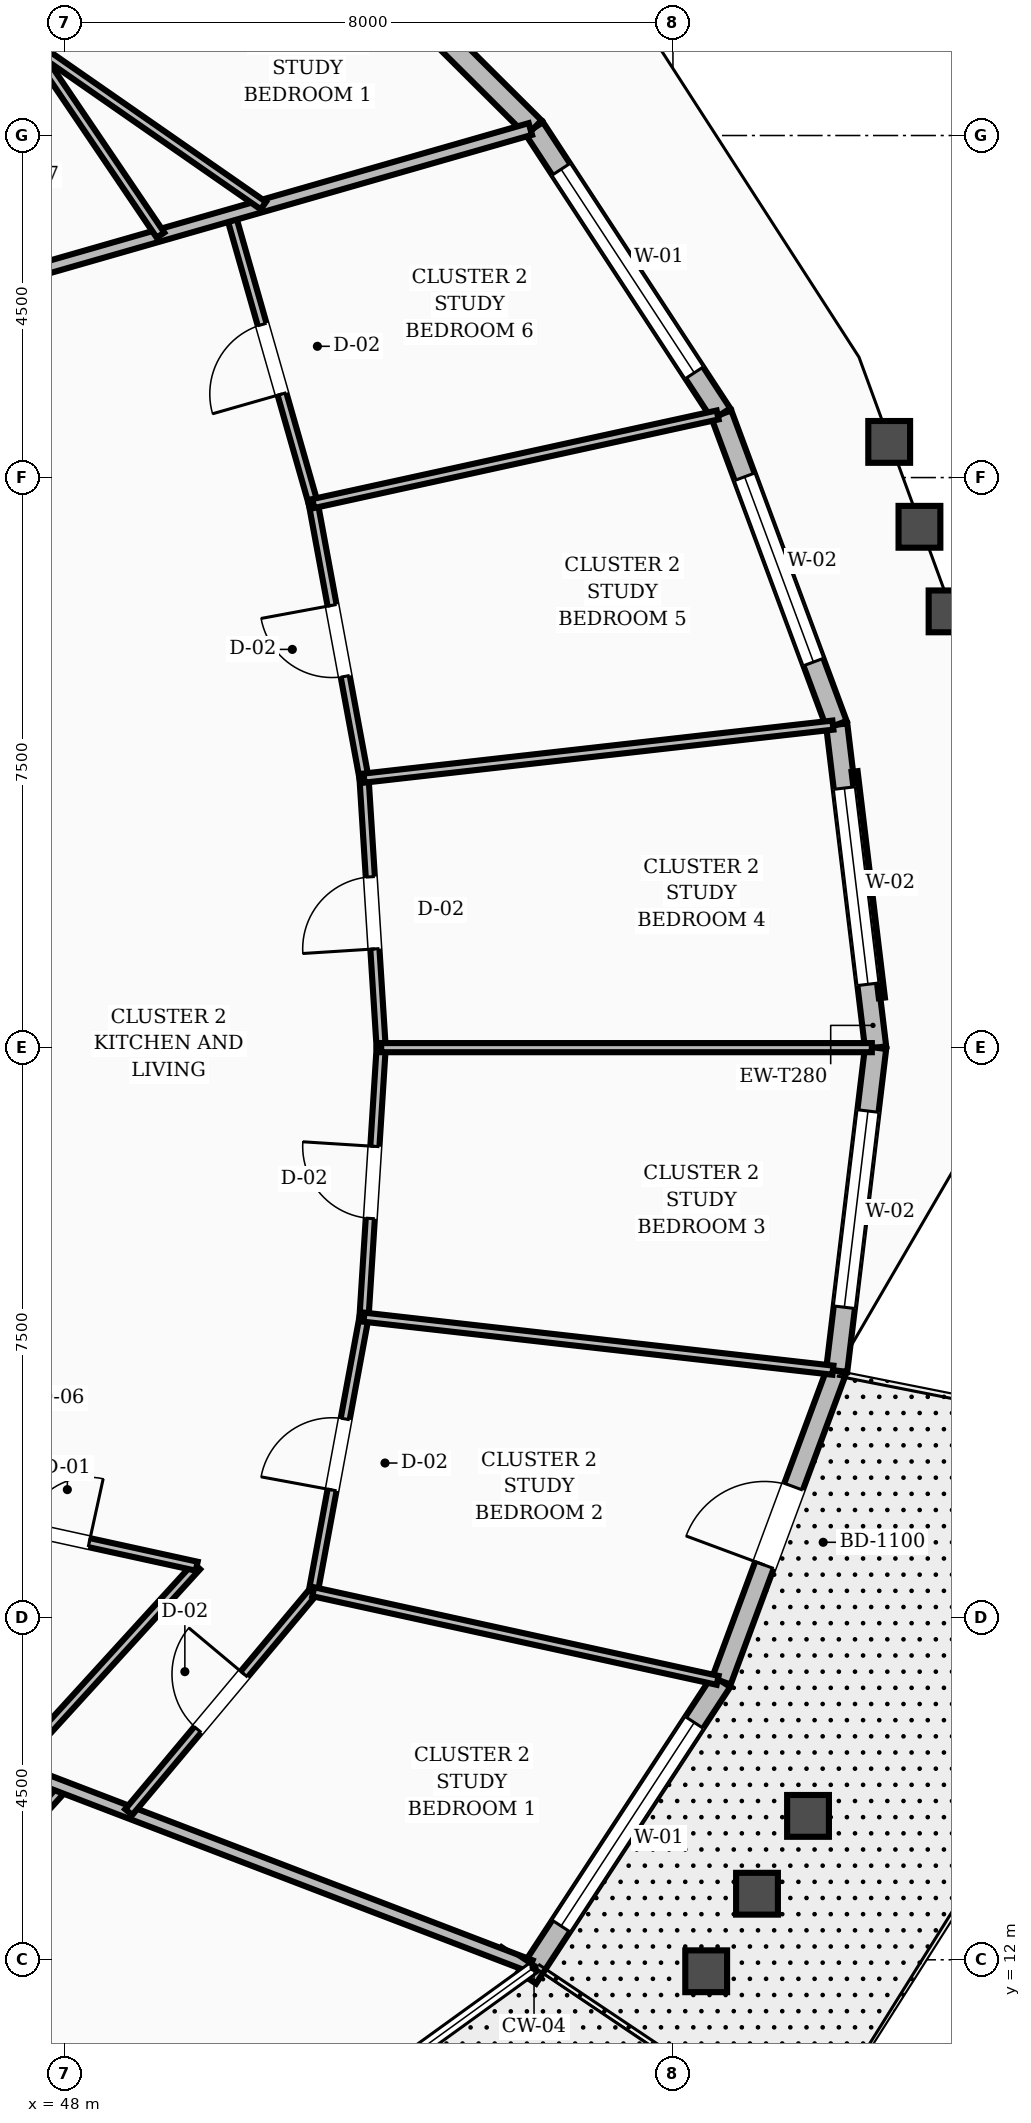
"""IFC4 building model, lengths in metres.
Left out: names, types, materials, properties, quantities, classifications, styles, units other than length and angle.
Written with IfcOpenShell. Run it as: python <this file> out.ifc"""

import sys

from ifc_helpers import new_model, si_unit, direction, frame, frame_2d, origin, place, context, subcontext, project, spatial, rectangle, extrude, element, fill, save


model = new_model("IFC4")
c1 = context("Model", 3, precision=1e-05, world=origin(), true_north=direction((0.0, 1.0)))
c2 = subcontext(c1, "Body", "Model", "MODEL_VIEW")
j1 = project(units=[si_unit("LENGTHUNIT", "METRE"), si_unit("PLANEANGLEUNIT", "RADIAN")], contexts=[c1])
p1 = place(None, origin())
s1 = spatial("IfcSite", under=j1, at=p1, CompositionType="ELEMENT")
p2 = place(p1, origin())
s2 = spatial("IfcBuilding", under=s1, at=p2, CompositionType="ELEMENT")
p3 = place(p2, frame((0.0, 0.0, 124.4)))
s3 = spatial("IfcBuildingStorey", under=s2, at=p3, CompositionType="ELEMENT", Elevation=124.4)
p4 = place(p3, frame((58.667, 24.0, 0.0), z_axis=(0.0, 0.0, 1.0), x_axis=(-0.119687341708, 0.992811633813, 0.0)))
e1 = element("IfcWall", 1, at=p4, inside=s3, PredefinedType="STANDARD", context=c2, shape_type="SweptSolid", body=[
    extrude(rectangle(XDim=4.28, YDim=0.28, at=frame_2d((2.14, 0.0))), origin(), (0.0, 0.0, 1.0), 2.82),
])
p5 = place(p4, frame((0.84, 0.0, 0.8)))
e2 = element("IfcOpeningElement", 2, at=p5, cuts=e1, PredefinedType="OPENING", context=c2, shape_type="SweptSolid", body=[
    extrude(rectangle(XDim=2.6, YDim=1.65, at=frame_2d((1.3, 0.825))), frame((0.0, 0.15, 0.0), z_axis=(0.0, -1.0, 0.0), x_axis=(1.0, 0.0, 0.0)), (0.0, 0.0, 1.0), 0.3),
])
p6 = place(p3, frame((58.154, 28.249, 0.0), z_axis=(0.0, 0.0, 1.0), x_axis=(-0.348211846364, 0.937415868253, 0.0)))
e3 = element("IfcWall", 3, at=p6, inside=s3, PredefinedType="STANDARD", context=c2, shape_type="SweptSolid", body=[
    extrude(rectangle(XDim=4.358, YDim=0.28, at=frame_2d((2.179, 0.0))), origin(), (0.0, 0.0, 1.0), 2.82),
])
p7 = place(p6, frame((0.879, 0.0, 0.8)))
e4 = element("IfcOpeningElement", 4, at=p7, cuts=e3, PredefinedType="OPENING", context=c2, shape_type="SweptSolid", body=[
    extrude(rectangle(XDim=2.6, YDim=1.65, at=frame_2d((1.3, 0.825))), frame((0.0, 0.15, 0.0), z_axis=(0.0, -1.0, 0.0), x_axis=(1.0, 0.0, 0.0)), (0.0, 0.0, 1.0), 0.3),
])
p8 = place(p3, frame((56.637, 32.334, 0.0), z_axis=(0.0, 0.0, 1.0), x_axis=(-0.547581138096, 0.836752590197, 0.0)))
e5 = element("IfcWall", 5, at=p8, inside=s3, PredefinedType="STANDARD", context=c2, shape_type="SweptSolid", body=[
    extrude(rectangle(XDim=4.5, YDim=0.28, at=frame_2d((2.25, 0.0))), origin(), (0.0, 0.0, 1.0), 2.82),
])
p9 = place(p8, frame((0.65, 0.0, 0.8)))
e6 = element("IfcOpeningElement", 6, at=p9, cuts=e5, PredefinedType="OPENING", context=c2, shape_type="SweptSolid", body=[
    extrude(rectangle(XDim=3.2, YDim=1.65, at=frame_2d((1.6, 0.825))), frame((0.0, 0.15, 0.0), z_axis=(0.0, -1.0, 0.0), x_axis=(1.0, 0.0, 0.0)), (0.0, 0.0, 1.0), 0.3),
])
p10 = place(p3, frame((54.173, 36.1, 0.0), z_axis=(0.0, 0.0, 1.0), x_axis=(-0.708826657364, 0.70538271159, 0.0)))
e7 = element("IfcWall", 7, at=p10, inside=s3, PredefinedType="STANDARD", context=c2, shape_type="SweptSolid", body=[
    extrude(rectangle(XDim=4.679, YDim=0.28, at=frame_2d((2.339, 0.0))), origin(), (0.0, 0.0, 1.0), 2.82),
])
p11 = place(p3, frame((54.083, 11.763, 0.0), z_axis=(0.0, 0.0, 1.0), x_axis=(0.54762586096, 0.8367233213, 0.0)))
e8 = element("IfcWall", 8, at=p11, inside=s3, PredefinedType="STANDARD", context=c2, shape_type="SweptSolid", body=[
    extrude(rectangle(XDim=4.664, YDim=0.28, at=frame_2d((2.332, 0.0))), origin(), (0.0, 0.0, 1.0), 2.82),
])
p12 = place(p11, frame((0.814, 0.0, 0.8)))
e9 = element("IfcOpeningElement", 9, at=p12, cuts=e8, PredefinedType="OPENING", context=c2, shape_type="SweptSolid", body=[
    extrude(rectangle(XDim=3.2, YDim=1.65, at=frame_2d((1.6, 0.825))), frame((0.0, 0.15, 0.0), z_axis=(0.0, -1.0, 0.0), x_axis=(1.0, 0.0, 0.0)), (0.0, 0.0, 1.0), 0.3),
])
p13 = place(p3, frame((56.637, 15.666, 0.0), z_axis=(0.0, 0.0, 1.0), x_axis=(0.348211846364, 0.937415868253, 0.0)))
e10 = element("IfcWall", 10, at=p13, inside=s3, PredefinedType="STANDARD", context=c2, shape_type="SweptSolid", body=[
    extrude(rectangle(XDim=4.358, YDim=0.26, at=frame_2d((2.179, 0.0))), origin(), (0.0, 0.0, 1.0), 2.82),
])
p14 = place(p13, frame((1.629, 0.0, 0.0)))
e11 = element("IfcOpeningElement", 11, at=p14, cuts=e10, PredefinedType="OPENING", context=c2, shape_type="SweptSolid", body=[
    extrude(rectangle(XDim=1.1, YDim=2.15, at=frame_2d((0.55, 1.075))), frame((0.0, 0.14, 0.0), z_axis=(0.0, -1.0, 0.0), x_axis=(1.0, 0.0, 0.0)), (0.0, 0.0, 1.0), 0.28),
])
p15 = place(p3, frame((58.154, 19.751, 0.0), z_axis=(0.0, 0.0, 1.0), x_axis=(0.119687341708, 0.992811633813, 0.0)))
e12 = element("IfcWall", 12, at=p15, inside=s3, PredefinedType="STANDARD", context=c2, shape_type="SweptSolid", body=[
    extrude(rectangle(XDim=4.28, YDim=0.28, at=frame_2d((2.14, 0.0))), origin(), (0.0, 0.0, 1.0), 2.82),
])
p16 = place(p15, frame((0.84, 0.0, 0.8)))
e13 = element("IfcOpeningElement", 13, at=p16, cuts=e12, PredefinedType="OPENING", context=c2, shape_type="SweptSolid", body=[
    extrude(rectangle(XDim=2.6, YDim=1.65, at=frame_2d((1.3, 0.825))), frame((0.0, 0.15, 0.0), z_axis=(0.0, -1.0, 0.0), x_axis=(1.0, 0.0, 0.0)), (0.0, 0.0, 1.0), 0.3),
])
p17 = place(p3, frame((45.579, 11.631, 0.0), z_axis=(0.0, 0.0, 1.0), x_axis=(0.673346353961, 0.739327185762, 0.0)))
e14 = element("IfcWall", 14, at=p17, inside=s3, PredefinedType="PARTITIONING", context=c2, shape_type="SweptSolid", body=[
    extrude(rectangle(XDim=3.571, YDim=0.12, at=frame_2d((1.785, 0.0))), origin(), (0.0, 0.0, 1.0), 2.8),
])
p18 = place(p3, frame((44.65, 15.548, 0.0), z_axis=(0.0, 0.0, 1.0), x_axis=(0.933853161124, -0.35765664185, 0.0)))
e15 = element("IfcWall", 15, at=p18, inside=s3, PredefinedType="SOLIDWALL", context=c2, shape_type="SweptSolid", body=[
    extrude(rectangle(XDim=10.147, YDim=0.16, at=frame_2d((5.073, 0.0))), origin(), (0.0, 0.0, 1.0), 2.8),
])
p19 = place(p3, frame((47.316, 14.526, 0.0), z_axis=(0.0, 0.0, 1.0), x_axis=(0.673803025367, 0.738911011562, 0.0)))
e16 = element("IfcWall", 16, at=p19, inside=s3, PredefinedType="PARTITIONING", context=c2, shape_type="SweptSolid", body=[
    extrude(rectangle(XDim=3.589, YDim=0.12, at=frame_2d((1.794, 0.0))), origin(), (0.0, 0.0, 1.0), 2.8),
])
p20 = place(p3, frame((47.05, 17.766, 0.0), z_axis=(0.0, 0.0, 1.0), x_axis=(0.976828673368, -0.214022762541, 0.0)))
e17 = element("IfcWall", 17, at=p20, inside=s3, PredefinedType="PARTITIONING", context=c2, shape_type="SweptSolid", body=[
    extrude(rectangle(XDim=2.748, YDim=0.12, at=frame_2d((1.374, 0.0))), origin(), (0.0, 0.0, 1.0), 2.8),
])
p21 = place(p20, frame((0.44, 0.0, 0.0)))
e18 = element("IfcOpeningElement", 18, at=p21, cuts=e17, PredefinedType="OPENING", context=c2, shape_type="SweptSolid", body=[
    extrude(rectangle(XDim=0.86, YDim=2.1, at=frame_2d((0.43, 1.05))), frame((0.0, 0.07, 0.0), z_axis=(0.0, -1.0, 0.0), x_axis=(1.0, 0.0, 0.0)), (0.0, 0.0, 1.0), 0.14),
])
p22 = place(p3, frame((48.84, 13.943, 0.0), z_axis=(0.0, 0.0, 1.0), x_axis=(0.64212553746, 0.766599500483, 0.0)))
e19 = element("IfcWall", 19, at=p22, inside=s3, PredefinedType="PARTITIONING", context=c2, shape_type="SweptSolid", body=[
    extrude(rectangle(XDim=3.781, YDim=0.12, at=frame_2d((1.891, 0.0))), origin(), (0.0, 0.0, 1.0), 2.8),
])
p23 = place(p22, frame((1.416, 0.0, 0.0)))
e20 = element("IfcOpeningElement", 20, at=p23, cuts=e19, PredefinedType="OPENING", context=c2, shape_type="SweptSolid", body=[
    extrude(rectangle(XDim=0.95, YDim=2.1, at=frame_2d((0.475, 1.05))), frame((0.0, 0.07, 0.0), z_axis=(0.0, -1.0, 0.0), x_axis=(1.0, 0.0, 0.0)), (0.0, 0.0, 1.0), 0.14),
])
p24 = place(p3, frame((51.268, 16.842, 0.0), z_axis=(0.0, 0.0, 1.0), x_axis=(0.181767968599, 0.983341449137, 0.0)))
e21 = element("IfcWall", 21, at=p24, inside=s3, PredefinedType="PARTITIONING", context=c2, shape_type="SweptSolid", body=[
    extrude(rectangle(XDim=3.674, YDim=0.12, at=frame_2d((1.837, 0.0))), origin(), (0.0, 0.0, 1.0), 2.8),
])
p25 = place(p24, frame((1.362, 0.0, 0.0)))
e22 = element("IfcOpeningElement", 22, at=p25, cuts=e21, PredefinedType="OPENING", context=c2, shape_type="SweptSolid", body=[
    extrude(rectangle(XDim=0.95, YDim=2.1, at=frame_2d((0.475, 1.05))), frame((0.0, 0.07, 0.0), z_axis=(0.0, -1.0, 0.0), x_axis=(1.0, 0.0, 0.0)), (0.0, 0.0, 1.0), 0.14),
])
p26 = place(p3, frame((51.268, 16.842, 0.0), z_axis=(0.0, 0.0, 1.0), x_axis=(0.976839732101, -0.213972282759, 0.0)))
e23 = element("IfcWall", 23, at=p26, inside=s3, PredefinedType="PARTITIONING", context=c2, shape_type="SweptSolid", body=[
    extrude(rectangle(XDim=5.446, YDim=0.12, at=frame_2d((2.723, 0.0))), origin(), (0.0, 0.0, 1.0), 2.8),
])
p27 = place(p3, frame((51.936, 20.454, 0.0), z_axis=(0.0, 0.0, 1.0), x_axis=(0.063490483218, 0.997982444004, 0.0)))
e24 = element("IfcWall", 24, at=p27, inside=s3, PredefinedType="PARTITIONING", context=c2, shape_type="SweptSolid", body=[
    extrude(rectangle(XDim=3.553, YDim=0.12, at=frame_2d((1.776, 0.0))), origin(), (0.0, 0.0, 1.0), 2.8),
])
p28 = place(p27, frame((1.302, 0.0, 0.0)))
e25 = element("IfcOpeningElement", 25, at=p28, cuts=e24, PredefinedType="OPENING", context=c2, shape_type="SweptSolid", body=[
    extrude(rectangle(XDim=0.95, YDim=2.1, at=frame_2d((0.475, 1.05))), frame((0.0, 0.07, 0.0), z_axis=(0.0, -1.0, 0.0), x_axis=(1.0, 0.0, 0.0)), (0.0, 0.0, 1.0), 0.14),
])
p29 = place(p3, frame((51.936, 20.454, 0.0), z_axis=(0.0, 0.0, 1.0), x_axis=(0.993672361239, -0.112317578806, 0.0)))
e26 = element("IfcWall", 26, at=p29, inside=s3, PredefinedType="PARTITIONING", context=c2, shape_type="SweptSolid", body=[
    extrude(rectangle(XDim=6.208, YDim=0.12, at=frame_2d((3.104, 0.0))), origin(), (0.0, 0.0, 1.0), 2.8),
])
p30 = place(p3, frame((52.161, 24.0, 0.0), z_axis=(0.0, 0.0, 1.0), x_axis=(-0.063490483218, 0.997982444004, 0.0)))
e27 = element("IfcWall", 27, at=p30, inside=s3, PredefinedType="PARTITIONING", context=c2, shape_type="SweptSolid", body=[
    extrude(rectangle(XDim=3.553, YDim=0.12, at=frame_2d((1.776, 0.0))), origin(), (0.0, 0.0, 1.0), 2.8),
])
p31 = place(p30, frame((1.302, 0.0, 0.0)))
e28 = element("IfcOpeningElement", 28, at=p31, cuts=e27, PredefinedType="OPENING", context=c2, shape_type="SweptSolid", body=[
    extrude(rectangle(XDim=0.95, YDim=2.1, at=frame_2d((0.475, 1.05))), frame((0.0, 0.07, 0.0), z_axis=(0.0, -1.0, 0.0), x_axis=(1.0, 0.0, 0.0)), (0.0, 0.0, 1.0), 0.14),
])
p32 = place(p3, frame((52.161, 24.0, 0.0), z_axis=(0.0, 0.0, 1.0), x_axis=(1.0, 0.0, 0.0)))
e29 = element("IfcWall", 29, at=p32, inside=s3, PredefinedType="PARTITIONING", context=c2, shape_type="SweptSolid", body=[
    extrude(rectangle(XDim=6.455, YDim=0.12, at=frame_2d((3.228, 0.0))), origin(), (0.0, 0.0, 1.0), 2.8),
])
p33 = place(p3, frame((51.936, 27.546, 0.0), z_axis=(0.0, 0.0, 1.0), x_axis=(-0.181767968599, 0.983341449137, 0.0)))
e30 = element("IfcWall", 30, at=p33, inside=s3, PredefinedType="PARTITIONING", context=c2, shape_type="SweptSolid", body=[
    extrude(rectangle(XDim=3.674, YDim=0.12, at=frame_2d((1.837, 0.0))), origin(), (0.0, 0.0, 1.0), 2.8),
])
p34 = place(p33, frame((1.362, 0.0, 0.0)))
e31 = element("IfcOpeningElement", 31, at=p34, cuts=e30, PredefinedType="OPENING", context=c2, shape_type="SweptSolid", body=[
    extrude(rectangle(XDim=0.95, YDim=2.1, at=frame_2d((0.475, 1.05))), frame((0.0, 0.07, 0.0), z_axis=(0.0, -1.0, 0.0), x_axis=(1.0, 0.0, 0.0)), (0.0, 0.0, 1.0), 0.14),
])
p35 = place(p3, frame((51.936, 27.546, 0.0), z_axis=(0.0, 0.0, 1.0), x_axis=(0.993672361239, 0.112317578806, 0.0)))
e32 = element("IfcWall", 32, at=p35, inside=s3, PredefinedType="PARTITIONING", context=c2, shape_type="SweptSolid", body=[
    extrude(rectangle(XDim=6.208, YDim=0.12, at=frame_2d((3.104, 0.0))), origin(), (0.0, 0.0, 1.0), 2.8),
])
p36 = place(p3, frame((51.268, 31.158, 0.0), z_axis=(0.0, 0.0, 1.0), x_axis=(-0.274582301576, 0.961563601465, 0.0)))
e33 = element("IfcWall", 33, at=p36, inside=s3, PredefinedType="PARTITIONING", context=c2, shape_type="SweptSolid", body=[
    extrude(rectangle(XDim=3.949, YDim=0.12, at=frame_2d((1.974, 0.0))), origin(), (0.0, 0.0, 1.0), 2.8),
])
p37 = place(p36, frame((1.5, 0.0, 0.0)))
e34 = element("IfcOpeningElement", 34, at=p37, cuts=e33, PredefinedType="OPENING", context=c2, shape_type="SweptSolid", body=[
    extrude(rectangle(XDim=0.95, YDim=2.1, at=frame_2d((0.475, 1.05))), frame((0.0, 0.07, 0.0), z_axis=(0.0, -1.0, 0.0), x_axis=(1.0, 0.0, 0.0)), (0.0, 0.0, 1.0), 0.14),
])
p38 = place(p3, frame((51.268, 31.158, 0.0), z_axis=(0.0, 0.0, 1.0), x_axis=(0.976839732101, 0.213972282759, 0.0)))
e35 = element("IfcWall", 35, at=p38, inside=s3, PredefinedType="PARTITIONING", context=c2, shape_type="SweptSolid", body=[
    extrude(rectangle(XDim=5.446, YDim=0.12, at=frame_2d((2.723, 0.0))), origin(), (0.0, 0.0, 1.0), 2.8),
])
p39 = place(p3, frame((47.05, 34.056, 0.0), z_axis=(0.0, 0.0, 1.0), x_axis=(0.96122671613, 0.275759315705, 0.0)))
e36 = element("IfcWall", 36, at=p39, inside=s3, PredefinedType="SOLIDWALL", context=c2, shape_type="SweptSolid", body=[
    extrude(rectangle(XDim=7.36, YDim=0.16, at=frame_2d((3.68, 0.0))), origin(), (0.0, 0.0, 1.0), 2.8),
])
p40 = place(p3, frame((49.258, 34.69, 0.0), z_axis=(0.0, 0.0, 1.0), x_axis=(-0.560422606551, 0.828206799095, 0.0)))
e37 = element("IfcWall", 37, at=p40, inside=s3, PredefinedType="PARTITIONING", context=c2, shape_type="SweptSolid", body=[
    extrude(rectangle(XDim=3.959, YDim=0.12, at=frame_2d((1.979, 0.0))), origin(), (0.0, 0.0, 1.0), 2.8),
])
p41 = place(p3, frame((50.611, 35.078, 0.0), z_axis=(0.0, 0.0, 1.0), x_axis=(-0.821081312211, 0.570811246156, 0.0)))
e38 = element("IfcWall", 38, at=p41, inside=s3, PredefinedType="PARTITIONING", context=c2, shape_type="SweptSolid", body=[
    extrude(rectangle(XDim=8.192, YDim=0.12, at=frame_2d((4.096, 0.0))), origin(), (0.0, 0.0, 1.0), 2.8),
])
p42 = place(p41, frame((5.021, 0.0, 0.0)))
e39 = element("IfcOpeningElement", 39, at=p42, cuts=e38, PredefinedType="OPENING", context=c2, shape_type="SweptSolid", body=[
    extrude(rectangle(XDim=0.95, YDim=2.1, at=frame_2d((0.475, 1.05))), frame((0.0, 0.07, 0.0), z_axis=(0.0, -1.0, 0.0), x_axis=(1.0, 0.0, 0.0)), (0.0, 0.0, 1.0), 0.14),
])
p43 = place(p5, origin())
e40 = element("IfcWindow", 40, at=p43, inside=s3, PartitioningType="SINGLE_PANEL", PredefinedType="WINDOW", context=c2, shape_type="SweptSolid", body=[
    extrude(rectangle(XDim=2.6, YDim=1.65, at=frame_2d((1.3, 0.825))), frame((0.0, 0.03, 0.0), z_axis=(0.0, -1.0, 0.0), x_axis=(1.0, 0.0, 0.0)), (0.0, 0.0, 1.0), 0.06),
])
fill(e2, e40)
p44 = place(p7, origin())
e41 = element("IfcWindow", 41, at=p44, inside=s3, PartitioningType="SINGLE_PANEL", PredefinedType="WINDOW", context=c2, shape_type="SweptSolid", body=[
    extrude(rectangle(XDim=2.6, YDim=1.65, at=frame_2d((1.3, 0.825))), frame((0.0, 0.03, 0.0), z_axis=(0.0, -1.0, 0.0), x_axis=(1.0, 0.0, 0.0)), (0.0, 0.0, 1.0), 0.06),
])
fill(e4, e41)
p45 = place(p9, origin())
e42 = element("IfcWindow", 42, at=p45, inside=s3, PartitioningType="SINGLE_PANEL", PredefinedType="WINDOW", context=c2, shape_type="SweptSolid", body=[
    extrude(rectangle(XDim=3.2, YDim=1.65, at=frame_2d((1.6, 0.825))), frame((0.0, 0.03, 0.0), z_axis=(0.0, -1.0, 0.0), x_axis=(1.0, 0.0, 0.0)), (0.0, 0.0, 1.0), 0.06),
])
fill(e6, e42)
p46 = place(p12, origin())
e43 = element("IfcWindow", 43, at=p46, inside=s3, PartitioningType="SINGLE_PANEL", PredefinedType="WINDOW", context=c2, shape_type="SweptSolid", body=[
    extrude(rectangle(XDim=3.2, YDim=1.65, at=frame_2d((1.6, 0.825))), frame((0.0, 0.03, 0.0), z_axis=(0.0, -1.0, 0.0), x_axis=(1.0, 0.0, 0.0)), (0.0, 0.0, 1.0), 0.06),
])
fill(e9, e43)
p47 = place(p14, origin())
e44 = element("IfcDoor", 44, at=p47, inside=s3, OperationType="SINGLE_SWING_LEFT", PredefinedType="DOOR", context=c2, shape_type="SweptSolid", body=[
    extrude(rectangle(XDim=1.1, YDim=2.15, at=frame_2d((0.55, 1.075))), frame((0.0, 0.025, 0.0), z_axis=(0.0, -1.0, 0.0), x_axis=(1.0, 0.0, 0.0)), (0.0, 0.0, 1.0), 0.05),
])
fill(e11, e44)
p48 = place(p16, origin())
e45 = element("IfcWindow", 45, at=p48, inside=s3, PartitioningType="SINGLE_PANEL", PredefinedType="WINDOW", context=c2, shape_type="SweptSolid", body=[
    extrude(rectangle(XDim=2.6, YDim=1.65, at=frame_2d((1.3, 0.825))), frame((0.0, 0.03, 0.0), z_axis=(0.0, -1.0, 0.0), x_axis=(1.0, 0.0, 0.0)), (0.0, 0.0, 1.0), 0.06),
])
fill(e13, e45)
p49 = place(p21, origin())
e46 = element("IfcDoor", 46, at=p49, inside=s3, OperationType="SINGLE_SWING_RIGHT", PredefinedType="DOOR", context=c2, shape_type="SweptSolid", body=[
    extrude(rectangle(XDim=0.86, YDim=2.1, at=frame_2d((0.43, 1.05))), frame((0.0, 0.025, 0.0), z_axis=(0.0, -1.0, 0.0), x_axis=(1.0, 0.0, 0.0)), (0.0, 0.0, 1.0), 0.05),
])
fill(e18, e46)
p50 = place(p23, origin())
e47 = element("IfcDoor", 47, at=p50, inside=s3, OperationType="SINGLE_SWING_RIGHT", PredefinedType="DOOR", context=c2, shape_type="SweptSolid", body=[
    extrude(rectangle(XDim=0.95, YDim=2.1, at=frame_2d((0.475, 1.05))), frame((0.0, 0.025, 0.0), z_axis=(0.0, -1.0, 0.0), x_axis=(1.0, 0.0, 0.0)), (0.0, 0.0, 1.0), 0.05),
])
fill(e20, e47)
p51 = place(p25, origin())
e48 = element("IfcDoor", 48, at=p51, inside=s3, OperationType="SINGLE_SWING_LEFT", PredefinedType="DOOR", context=c2, shape_type="SweptSolid", body=[
    extrude(rectangle(XDim=0.95, YDim=2.1, at=frame_2d((0.475, 1.05))), frame((0.0, 0.025, 0.0), z_axis=(0.0, -1.0, 0.0), x_axis=(1.0, 0.0, 0.0)), (0.0, 0.0, 1.0), 0.05),
])
fill(e22, e48)
p52 = place(p28, origin())
e49 = element("IfcDoor", 49, at=p52, inside=s3, OperationType="SINGLE_SWING_RIGHT", PredefinedType="DOOR", context=c2, shape_type="SweptSolid", body=[
    extrude(rectangle(XDim=0.95, YDim=2.1, at=frame_2d((0.475, 1.05))), frame((0.0, 0.025, 0.0), z_axis=(0.0, -1.0, 0.0), x_axis=(1.0, 0.0, 0.0)), (0.0, 0.0, 1.0), 0.05),
])
fill(e25, e49)
p53 = place(p31, origin())
e50 = element("IfcDoor", 50, at=p53, inside=s3, OperationType="SINGLE_SWING_LEFT", PredefinedType="DOOR", context=c2, shape_type="SweptSolid", body=[
    extrude(rectangle(XDim=0.95, YDim=2.1, at=frame_2d((0.475, 1.05))), frame((0.0, 0.025, 0.0), z_axis=(0.0, -1.0, 0.0), x_axis=(1.0, 0.0, 0.0)), (0.0, 0.0, 1.0), 0.05),
])
fill(e28, e50)
p54 = place(p34, origin())
e51 = element("IfcDoor", 51, at=p54, inside=s3, OperationType="SINGLE_SWING_RIGHT", PredefinedType="DOOR", context=c2, shape_type="SweptSolid", body=[
    extrude(rectangle(XDim=0.95, YDim=2.1, at=frame_2d((0.475, 1.05))), frame((0.0, 0.025, 0.0), z_axis=(0.0, -1.0, 0.0), x_axis=(1.0, 0.0, 0.0)), (0.0, 0.0, 1.0), 0.05),
])
fill(e31, e51)
p55 = place(p37, origin())
e52 = element("IfcDoor", 52, at=p55, inside=s3, OperationType="SINGLE_SWING_LEFT", PredefinedType="DOOR", context=c2, shape_type="SweptSolid", body=[
    extrude(rectangle(XDim=0.95, YDim=2.1, at=frame_2d((0.475, 1.05))), frame((0.0, 0.025, 0.0), z_axis=(0.0, -1.0, 0.0), x_axis=(1.0, 0.0, 0.0)), (0.0, 0.0, 1.0), 0.05),
])
fill(e34, e52)
save(model, sys.argv[1])
